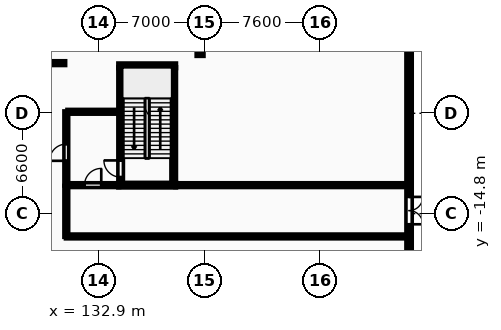
"""IFC4 building model, lengths in metres.
Left out: names, types, materials, properties, quantities, classifications, styles, units other than length and angle.
Written with IfcOpenShell. Run it as: python <this file> out.ifc"""

import sys

from ifc_helpers import new_model, si_unit, direction, frame, frame_2d, origin, origin_2d, place, context, subcontext, project, spatial, rectangle, i_section, extrude, element, fill, save


model = new_model("IFC4")
c1 = context("Model", 3, precision=1e-05, world=origin(), true_north=direction((0.0, 1.0)))
c2 = subcontext(c1, "Body", "Model", "MODEL_VIEW")
j1 = project(units=[si_unit("LENGTHUNIT", "METRE"), si_unit("PLANEANGLEUNIT", "RADIAN")], contexts=[c1])
p1 = place(None, origin())
s1 = spatial("IfcSite", under=j1, at=p1, CompositionType="ELEMENT")
p2 = place(p1, origin())
s2 = spatial("IfcBuilding", under=s1, at=p2, CompositionType="ELEMENT")
p3 = place(p2, origin())
s3 = spatial("IfcBuildingStorey", under=s2, at=p3, CompositionType="ELEMENT", Elevation=0.0)
p4 = place(p3, frame((139.6, -4.2, 0.0), z_axis=(0.0, 0.0, 1.0), x_axis=(1.0, 0.0, 0.0)))
e1 = element("IfcColumn", 1, at=p4, inside=s3, PredefinedType="COLUMN", context=c2, shape_type="SweptSolid", body=[
    extrude(i_section(OverallWidth=0.399, OverallDepth=0.394, WebThickness=0.023, FlangeThickness=0.037, FilletRadius=0.015, at=origin_2d()), origin(), (0.0, 0.0, 1.0), 5.4),
])
p5 = place(p3, frame((153.35, -26.5, 0.0), z_axis=(0.0, 0.0, 1.0), x_axis=(0.0, 1.0, 0.0)))
e2 = element("IfcWall", 2, at=p5, inside=s3, PredefinedType="STANDARD", context=c2, shape_type="SweptSolid", body=[
    extrude(rectangle(XDim=135.7, YDim=0.3, at=frame_2d((67.85, 0.0))), origin(), (0.0, 0.0, 1.0), 5.1),
])
p6 = place(p5, frame((60.8, 0.0, 0.0)))
e3 = element("IfcOpeningElement", 3, at=p6, cuts=e2, PredefinedType="OPENING", context=c2, shape_type="SweptSolid", body=[
    extrude(rectangle(XDim=7.2, YDim=3.2, at=frame_2d((3.6, 1.6))), frame((0.0, 0.16, 0.0), z_axis=(0.0, -1.0, 0.0), x_axis=(1.0, 0.0, 0.0)), (0.0, 0.0, 1.0), 0.32),
])
p7 = place(p5, frame((70.1, 0.0, 0.0)))
e4 = element("IfcOpeningElement", 4, at=p7, cuts=e2, PredefinedType="OPENING", context=c2, shape_type="SweptSolid", body=[
    extrude(rectangle(XDim=1.8, YDim=2.2, at=frame_2d((0.9, 1.1))), frame((0.0, 0.16, 0.0), z_axis=(0.0, -1.0, 0.0), x_axis=(1.0, 0.0, 0.0)), (0.0, 0.0, 1.0), 0.32),
])
p8 = place(p5, frame((77.5, 0.0, 0.0)))
e5 = element("IfcOpeningElement", 5, at=p8, cuts=e2, PredefinedType="OPENING", context=c2, shape_type="SweptSolid", body=[
    extrude(rectangle(XDim=4.2, YDim=3.6, at=frame_2d((2.1, 1.8))), frame((0.0, 0.16, 0.0), z_axis=(0.0, -1.0, 0.0), x_axis=(1.0, 0.0, 0.0)), (0.0, 0.0, 1.0), 0.32),
])
p9 = place(p5, frame((11.0, 0.0, 0.0)))
e6 = element("IfcOpeningElement", 6, at=p9, cuts=e2, PredefinedType="OPENING", context=c2, shape_type="SweptSolid", body=[
    extrude(rectangle(XDim=1.8, YDim=2.2, at=frame_2d((0.9, 1.1))), frame((0.0, 0.16, 0.0), z_axis=(0.0, -1.0, 0.0), x_axis=(1.0, 0.0, 0.0)), (0.0, 0.0, 1.0), 0.32),
])
p10 = place(p5, frame((105.8, 0.0, 0.0)))
e7 = element("IfcOpeningElement", 7, at=p10, cuts=e2, PredefinedType="OPENING", context=c2, shape_type="SweptSolid", body=[
    extrude(rectangle(XDim=1.8, YDim=2.2, at=frame_2d((0.9, 1.1))), frame((0.0, 0.16, 0.0), z_axis=(0.0, -1.0, 0.0), x_axis=(1.0, 0.0, 0.0)), (0.0, 0.0, 1.0), 0.32),
])
p11 = place(p3, frame((134.375, -12.8, 0.0), z_axis=(0.0, 0.0, 1.0), x_axis=(0.0, 1.0, 0.0)))
e8 = element("IfcWall", 8, at=p11, inside=s3, PredefinedType="SHEAR", context=c2, shape_type="SweptSolid", body=[
    extrude(rectangle(XDim=7.6, YDim=0.25, at=frame_2d((3.8, 0.0))), origin(), (0.0, 0.0, 1.0), 5.4),
])
p12 = place(p11, frame((0.4, 0.0, 0.0)))
e9 = element("IfcOpeningElement", 9, at=p12, cuts=e8, PredefinedType="OPENING", context=c2, shape_type="SweptSolid", body=[
    extrude(rectangle(XDim=1.1, YDim=2.1, at=frame_2d((0.55, 1.05))), frame((0.0, 0.135, 0.0), z_axis=(0.0, -1.0, 0.0), x_axis=(1.0, 0.0, 0.0)), (0.0, 0.0, 1.0), 0.27),
])
p13 = place(p3, frame((137.865, -12.8, 0.0), z_axis=(0.0, 0.0, 1.0), x_axis=(0.0, 1.0, 0.0)))
e10 = element("IfcWall", 10, at=p13, inside=s3, PredefinedType="SHEAR", context=c2, shape_type="SweptSolid", body=[
    extrude(rectangle(XDim=7.6, YDim=0.25, at=frame_2d((3.8, 0.0))), origin(), (0.0, 0.0, 1.0), 5.4),
])
for number, where, z_axis, x_axis in (
    (11, (134.25, -12.925, 0.0), (0.0, 0.0, 1.0), (1.0, 0.0, 0.0)),
    (12, (134.25, -5.075, 0.0), (0.0, 0.0, 1.0), (1.0, 0.0, 0.0)),
):
    element("IfcWall", number, at=place(p3, frame(where, z_axis=z_axis, x_axis=x_axis)), inside=s3, PredefinedType="SHEAR", context=c2, shape_type="SweptSolid", body=[
        extrude(rectangle(XDim=3.74, YDim=0.25, at=frame_2d((1.87, 0.0))), origin(), (0.0, 0.0, 1.0), 5.4),
    ])
p14 = place(p3, frame((130.8, -12.925, 0.0), z_axis=(0.0, 0.0, 1.0), x_axis=(0.0, 1.0, 0.0)))
e13 = element("IfcWall", 13, at=p14, inside=s3, PredefinedType="PARTITIONING", context=c2, shape_type="SweptSolid", body=[
    extrude(rectangle(XDim=4.825, YDim=0.2, at=frame_2d((2.413, 0.0))), origin(), (0.0, 0.0, 1.0), 5.1),
])
p15 = place(p14, frame((1.6, 0.0, 0.0)))
e14 = element("IfcOpeningElement", 14, at=p15, cuts=e13, PredefinedType="OPENING", context=c2, shape_type="SweptSolid", body=[
    extrude(rectangle(XDim=1.1, YDim=2.15, at=frame_2d((0.55, 1.075))), frame((0.0, 0.11, 0.0), z_axis=(0.0, -1.0, 0.0), x_axis=(1.0, 0.0, 0.0)), (0.0, 0.0, 1.0), 0.22),
])
p16 = place(p3, frame((130.9, -12.925, 0.0), z_axis=(0.0, 0.0, 1.0), x_axis=(1.0, 0.0, 0.0)))
e15 = element("IfcWall", 15, at=p16, inside=s3, PredefinedType="PARTITIONING", context=c2, shape_type="SweptSolid", body=[
    extrude(rectangle(XDim=3.35, YDim=0.2, at=frame_2d((1.675, 0.0))), origin(), (0.0, 0.0, 1.0), 5.1),
])
p17 = place(p16, frame((1.1, 0.0, 0.0)))
e16 = element("IfcOpeningElement", 16, at=p17, cuts=e15, PredefinedType="OPENING", context=c2, shape_type="SweptSolid", body=[
    extrude(rectangle(XDim=1.1, YDim=2.1, at=frame_2d((0.55, 1.05))), frame((0.0, 0.11, 0.0), z_axis=(0.0, -1.0, 0.0), x_axis=(1.0, 0.0, 0.0)), (0.0, 0.0, 1.0), 0.22),
])
p18 = place(p3, frame((130.9, -8.1, 0.0), z_axis=(0.0, 0.0, 1.0), x_axis=(1.0, 0.0, 0.0)))
e17 = element("IfcWall", 17, at=p18, inside=s3, PredefinedType="PARTITIONING", context=c2, shape_type="SweptSolid", body=[
    extrude(rectangle(XDim=3.35, YDim=0.2, at=frame_2d((1.675, 0.0))), origin(), (0.0, 0.0, 1.0), 5.1),
])
p19 = place(p3, frame((130.8, -16.3, 0.0), z_axis=(0.0, 0.0, 1.0), x_axis=(1.0, 0.0, 0.0)))
e18 = element("IfcWall", 18, at=p19, inside=s3, PredefinedType="PARTITIONING", context=c2, shape_type="SweptSolid", body=[
    extrude(rectangle(XDim=22.4, YDim=0.2, at=frame_2d((11.2, 0.0))), origin(), (0.0, 0.0, 1.0), 5.1),
])
p20 = place(p3, frame((138.0, -12.925, 0.0), z_axis=(0.0, 0.0, 1.0), x_axis=(1.0, 0.0, 0.0)))
e19 = element("IfcWall", 19, at=p20, inside=s3, PredefinedType="PARTITIONING", context=c2, shape_type="SweptSolid", body=[
    extrude(rectangle(XDim=15.2, YDim=0.2, at=frame_2d((7.6, 0.0))), origin(), (0.0, 0.0, 1.0), 5.1),
])
p21 = place(p3, frame((130.8, -16.3, 0.0), z_axis=(0.0, 0.0, 1.0), x_axis=(0.0, 1.0, 0.0)))
e20 = element("IfcWall", 20, at=p21, inside=s3, PredefinedType="PARTITIONING", context=c2, shape_type="SweptSolid", body=[
    extrude(rectangle(XDim=3.3, YDim=0.2, at=frame_2d((1.65, 0.0))), origin(), (0.0, 0.0, 1.0), 5.1),
])
p22 = place(p3, frame((118.25, -4.9, 0.0), z_axis=(0.0, 0.0, 1.0), x_axis=(1.0, 0.0, 0.0)))
e21 = element("IfcWall", 21, at=p22, inside=s3, PredefinedType="PARTITIONING", context=c2, shape_type="SweptSolid", body=[
    extrude(rectangle(XDim=12.45, YDim=0.2, at=frame_2d((6.225, 0.0))), origin(), (0.0, 0.0, 1.0), 5.1),
])
p23 = place(p9, frame((1.8, 0.0, 0.0), z_axis=(0.0, 0.0, 1.0), x_axis=(-1.0, 0.0, 0.0)))
e22 = element("IfcDoor", 22, at=p23, inside=s3, OperationType="DOUBLE_DOOR_SINGLE_SWING", PredefinedType="DOOR", context=c2, shape_type="SweptSolid", body=[
    extrude(rectangle(XDim=1.8, YDim=2.2, at=frame_2d((0.9, 1.1))), frame((0.0, 0.025, 0.0), z_axis=(0.0, -1.0, 0.0), x_axis=(1.0, 0.0, 0.0)), (0.0, 0.0, 1.0), 0.05),
])
fill(e6, e22)
p24 = place(p12, origin())
e23 = element("IfcDoor", 23, at=p24, inside=s3, OperationType="SINGLE_SWING_RIGHT", PredefinedType="DOOR", context=c2, shape_type="SweptSolid", body=[
    extrude(rectangle(XDim=1.1, YDim=2.1, at=frame_2d((0.55, 1.05))), frame((0.0, 0.025, 0.0), z_axis=(0.0, -1.0, 0.0), x_axis=(1.0, 0.0, 0.0)), (0.0, 0.0, 1.0), 0.05),
])
fill(e9, e23)
p25 = place(p15, origin())
e24 = element("IfcDoor", 24, at=p25, inside=s3, OperationType="SINGLE_SWING_LEFT", PredefinedType="DOOR", context=c2, shape_type="SweptSolid", body=[
    extrude(rectangle(XDim=1.1, YDim=2.15, at=frame_2d((0.55, 1.075))), frame((0.0, 0.025, 0.0), z_axis=(0.0, -1.0, 0.0), x_axis=(1.0, 0.0, 0.0)), (0.0, 0.0, 1.0), 0.05),
])
fill(e14, e24)
p26 = place(p17, origin())
e25 = element("IfcDoor", 25, at=p26, inside=s3, OperationType="SINGLE_SWING_RIGHT", PredefinedType="DOOR", context=c2, shape_type="SweptSolid", body=[
    extrude(rectangle(XDim=1.1, YDim=2.1, at=frame_2d((0.55, 1.05))), frame((0.0, 0.025, 0.0), z_axis=(0.0, -1.0, 0.0), x_axis=(1.0, 0.0, 0.0)), (0.0, 0.0, 1.0), 0.05),
])
fill(e16, e25)
save(model, sys.argv[1])
